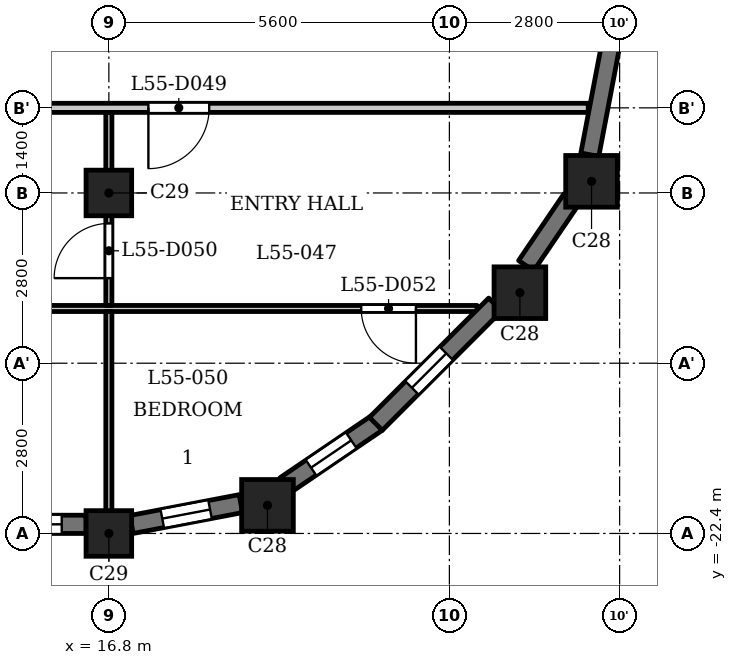
"""IFC4 building model, lengths in metres.
Left out: names, types, materials, properties, quantities, classifications, styles, units other than length and angle.
Written with IfcOpenShell. Run it as: python <this file> out.ifc"""

import sys

from ifc_helpers import new_model, si_unit, direction, frame, frame_2d, origin, origin_2d, place, context, subcontext, project, spatial, rectangle, extrude, element, fill, save


model = new_model("IFC4")
c1 = context("Model", 3, precision=1e-05, world=origin(), true_north=direction((0.0, 1.0)))
c2 = subcontext(c1, "Body", "Model", "MODEL_VIEW")
j1 = project(units=[si_unit("LENGTHUNIT", "METRE"), si_unit("PLANEANGLEUNIT", "RADIAN")], contexts=[c1])
p1 = place(None, origin())
s1 = spatial("IfcSite", under=j1, at=p1, CompositionType="ELEMENT")
p2 = place(p1, origin())
s2 = spatial("IfcBuilding", under=s1, at=p2, CompositionType="ELEMENT")
p3 = place(p2, frame((0.0, 0.0, 213.4)))
s3 = spatial("IfcBuildingStorey", under=s2, at=p3, CompositionType="ELEMENT", Elevation=213.4)
for number, where, z_axis, x_axis in (
    (1, (19.409, -21.938, 0.0), (0.0, 0.0, 1.0), (1.0, 0.0, 0.0)),
    (2, (23.56, -18.44, 0.0), (0.0, 0.0, 1.0), (1.0, 0.0, 0.0)),
    (3, (24.738, -16.609, 0.0), (0.0, 0.0, 1.0), (1.0, 0.0, 0.0)),
):
    element("IfcColumn", number, at=place(p3, frame(where, z_axis=z_axis, x_axis=x_axis)), inside=s3, PredefinedType="COLUMN", context=c2, shape_type="SweptSolid", body=[
        extrude(rectangle(XDim=0.85, YDim=0.85, at=origin_2d()), origin(), (0.0, 0.0, 1.0), 3.5),
    ])
for number, where, z_axis, x_axis in (
    (4, (16.8, -22.4, 0.0), (0.0, 0.0, 1.0), (1.0, 0.0, 0.0)),
    (5, (16.8, -16.8, 0.0), (0.0, 0.0, 1.0), (1.0, 0.0, 0.0)),
):
    element("IfcColumn", number, at=place(p3, frame(where, z_axis=z_axis, x_axis=x_axis)), inside=s3, PredefinedType="COLUMN", context=c2, shape_type="SweptSolid", body=[
        extrude(rectangle(XDim=0.75, YDim=0.75, at=origin_2d()), origin(), (0.0, 0.0, 1.0), 3.5),
    ])
p4 = place(p3, frame((14.425, -22.25, 0.0), z_axis=(0.0, 0.0, 1.0), x_axis=(1.0, 0.0, 0.0)))
e6 = element("IfcWall", 6, at=p4, inside=s3, PredefinedType="SOLIDWALL", context=c2, shape_type="SweptSolid", body=[
    extrude(rectangle(XDim=2.0, YDim=0.3, at=frame_2d((1.0, 0.0))), origin(), (0.0, 0.0, 1.0), 2.5),
])
p5 = place(p4, frame((0.4, 0.0, 0.6)))
e7 = element("IfcOpeningElement", 7, at=p5, cuts=e6, PredefinedType="OPENING", context=c2, shape_type="SweptSolid", body=[
    extrude(rectangle(XDim=1.2, YDim=1.55, at=frame_2d((0.6, 0.775))), frame((0.0, 0.16, 0.0), z_axis=(0.0, -1.0, 0.0), x_axis=(1.0, 0.0, 0.0)), (0.0, 0.0, 1.0), 0.32),
])
p6 = place(p3, frame((17.172, -22.253, 0.0), z_axis=(0.0, 0.0, 1.0), x_axis=(0.982300037503, 0.187314271538, 0.0)))
e8 = element("IfcWall", 8, at=p6, inside=s3, PredefinedType="SOLIDWALL", context=c2, shape_type="SweptSolid", body=[
    extrude(rectangle(XDim=1.831, YDim=0.3, at=frame_2d((0.916, 0.0))), origin(), (0.0, 0.0, 1.0), 2.5),
])
p7 = place(p6, frame((0.516, 0.0, 0.6)))
e9 = element("IfcOpeningElement", 9, at=p7, cuts=e8, PredefinedType="OPENING", context=c2, shape_type="SweptSolid", body=[
    extrude(rectangle(XDim=0.8, YDim=1.55, at=frame_2d((0.4, 0.775))), frame((0.0, 0.16, 0.0), z_axis=(0.0, -1.0, 0.0), x_axis=(1.0, 0.0, 0.0)), (0.0, 0.0, 1.0), 0.32),
])
p8 = place(p3, frame((19.698, -21.608, 0.0), z_axis=(0.0, 0.0, 1.0), x_axis=(0.82705295608, 0.562124014644, 0.0)))
e10 = element("IfcWall", 10, at=p8, inside=s3, PredefinedType="SOLIDWALL", context=c2, shape_type="SweptSolid", body=[
    extrude(rectangle(XDim=1.831, YDim=0.3, at=frame_2d((0.916, 0.0))), origin(), (0.0, 0.0, 1.0), 2.5),
])
p9 = place(p8, frame((0.516, 0.0, 0.6)))
e11 = element("IfcOpeningElement", 11, at=p9, cuts=e10, PredefinedType="OPENING", context=c2, shape_type="SweptSolid", body=[
    extrude(rectangle(XDim=0.8, YDim=1.55, at=frame_2d((0.4, 0.775))), frame((0.0, 0.16, 0.0), z_axis=(0.0, -1.0, 0.0), x_axis=(1.0, 0.0, 0.0)), (0.0, 0.0, 1.0), 0.32),
])
p10 = place(p3, frame((21.191, -20.597, 0.0), z_axis=(0.0, 0.0, 1.0), x_axis=(0.707150767798, 0.707062791838, 0.0)))
e12 = element("IfcWall", 12, at=p10, inside=s3, PredefinedType="SOLIDWALL", context=c2, shape_type="SweptSolid", body=[
    extrude(rectangle(XDim=2.775, YDim=0.3, at=frame_2d((1.388, 0.0))), origin(), (0.0, 0.0, 1.0), 2.5),
])
p11 = place(p10, frame((0.838, 0.0, 0.6)))
e13 = element("IfcOpeningElement", 13, at=p11, cuts=e12, PredefinedType="OPENING", context=c2, shape_type="SweptSolid", body=[
    extrude(rectangle(XDim=0.8, YDim=1.55, at=frame_2d((0.4, 0.775))), frame((0.0, 0.16, 0.0), z_axis=(0.0, -1.0, 0.0), x_axis=(1.0, 0.0, 0.0)), (0.0, 0.0, 1.0), 0.32),
])
p12 = place(p3, frame((23.662, -17.996, 0.0), z_axis=(0.0, 0.0, 1.0), x_axis=(0.562149004813, 0.827035970432, 0.0)))
e14 = element("IfcWall", 14, at=p12, inside=s3, PredefinedType="SOLIDWALL", context=c2, shape_type="SweptSolid", body=[
    extrude(rectangle(XDim=1.327, YDim=0.3, at=frame_2d((0.664, 0.0))), origin(), (0.0, 0.0, 1.0), 2.5),
])
p13 = place(p3, frame((24.709, -16.171, 0.0), z_axis=(0.0, 0.0, 1.0), x_axis=(0.187442908742, 0.982275499014, 0.0)))
e15 = element("IfcWall", 15, at=p13, inside=s3, PredefinedType="SOLIDWALL", context=c2, shape_type="SweptSolid", body=[
    extrude(rectangle(XDim=1.831, YDim=0.3, at=frame_2d((0.916, 0.0))), origin(), (0.0, 0.0, 1.0), 2.5),
])
p14 = place(p3, frame((-22.856, -18.7, 0.0), z_axis=(0.0, 0.0, 1.0), x_axis=(1.0, 0.0, 0.0)))
e16 = element("IfcWall", 16, at=p14, inside=s3, PredefinedType="PARTITIONING", context=c2, shape_type="SweptSolid", body=[
    extrude(rectangle(XDim=45.711, YDim=0.1, at=frame_2d((22.856, 0.0))), origin(), (0.0, 0.0, 1.0), 3.2),
])
p15 = place(p14, frame((4.084, 0.0, 0.0)))
e17 = element("IfcOpeningElement", 17, at=p15, cuts=e16, PredefinedType="OPENING", context=c2, shape_type="SweptSolid", body=[
    extrude(rectangle(XDim=0.9, YDim=2.1, at=frame_2d((0.45, 1.05))), frame((0.0, 0.06, 0.0), z_axis=(0.0, -1.0, 0.0), x_axis=(1.0, 0.0, 0.0)), (0.0, 0.0, 1.0), 0.12),
])
p16 = place(p14, frame((7.456, 0.0, 0.0)))
e18 = element("IfcOpeningElement", 18, at=p16, cuts=e16, PredefinedType="OPENING", context=c2, shape_type="SweptSolid", body=[
    extrude(rectangle(XDim=0.9, YDim=2.1, at=frame_2d((0.45, 1.05))), frame((0.0, 0.06, 0.0), z_axis=(0.0, -1.0, 0.0), x_axis=(1.0, 0.0, 0.0)), (0.0, 0.0, 1.0), 0.12),
])
p17 = place(p14, frame((23.506, 0.0, 0.0)))
e19 = element("IfcOpeningElement", 19, at=p17, cuts=e16, PredefinedType="OPENING", context=c2, shape_type="SweptSolid", body=[
    extrude(rectangle(XDim=0.8, YDim=2.1, at=frame_2d((0.4, 1.05))), frame((0.0, 0.06, 0.0), z_axis=(0.0, -1.0, 0.0), x_axis=(1.0, 0.0, 0.0)), (0.0, 0.0, 1.0), 0.12),
])
p18 = place(p14, frame((17.906, 0.0, 0.0)))
e20 = element("IfcOpeningElement", 20, at=p18, cuts=e16, PredefinedType="OPENING", context=c2, shape_type="SweptSolid", body=[
    extrude(rectangle(XDim=0.9, YDim=2.1, at=frame_2d((0.45, 1.05))), frame((0.0, 0.06, 0.0), z_axis=(0.0, -1.0, 0.0), x_axis=(1.0, 0.0, 0.0)), (0.0, 0.0, 1.0), 0.12),
])
p19 = place(p14, frame((43.806, 0.0, 0.0)))
e21 = element("IfcOpeningElement", 21, at=p19, cuts=e16, PredefinedType="OPENING", context=c2, shape_type="SweptSolid", body=[
    extrude(rectangle(XDim=0.9, YDim=2.1, at=frame_2d((0.45, 1.05))), frame((0.0, 0.06, 0.0), z_axis=(0.0, -1.0, 0.0), x_axis=(1.0, 0.0, 0.0)), (0.0, 0.0, 1.0), 0.12),
])
p20 = place(p14, frame((34.706, 0.0, 0.0)))
e22 = element("IfcOpeningElement", 22, at=p20, cuts=e16, PredefinedType="OPENING", context=c2, shape_type="SweptSolid", body=[
    extrude(rectangle(XDim=0.9, YDim=2.1, at=frame_2d((0.45, 1.05))), frame((0.0, 0.06, 0.0), z_axis=(0.0, -1.0, 0.0), x_axis=(1.0, 0.0, 0.0)), (0.0, 0.0, 1.0), 0.12),
])
p21 = place(p3, frame((-24.684, -15.4, 0.0), z_axis=(0.0, 0.0, 1.0), x_axis=(1.0, 0.0, 0.0)))
e23 = element("IfcWall", 23, at=p21, inside=s3, PredefinedType="PARTITIONING", context=c2, shape_type="SweptSolid", body=[
    extrude(rectangle(XDim=49.368, YDim=0.15, at=frame_2d((24.684, 0.0))), origin(), (0.0, 0.0, 1.0), 3.2),
])
p22 = place(p21, frame((1.143, 0.0, 0.0)))
e24 = element("IfcOpeningElement", 24, at=p22, cuts=e23, PredefinedType="OPENING", context=c2, shape_type="SweptSolid", body=[
    extrude(rectangle(XDim=1.0, YDim=2.1, at=frame_2d((0.5, 1.05))), frame((0.0, 0.085, 0.0), z_axis=(0.0, -1.0, 0.0), x_axis=(1.0, 0.0, 0.0)), (0.0, 0.0, 1.0), 0.17),
])
p23 = place(p21, frame((19.734, 0.0, 0.0)))
e25 = element("IfcOpeningElement", 25, at=p23, cuts=e23, PredefinedType="OPENING", context=c2, shape_type="SweptSolid", body=[
    extrude(rectangle(XDim=1.0, YDim=2.1, at=frame_2d((0.5, 1.05))), frame((0.0, 0.085, 0.0), z_axis=(0.0, -1.0, 0.0), x_axis=(1.0, 0.0, 0.0)), (0.0, 0.0, 1.0), 0.17),
])
p24 = place(p21, frame((42.134, 0.0, 0.0)))
e26 = element("IfcOpeningElement", 26, at=p24, cuts=e23, PredefinedType="OPENING", context=c2, shape_type="SweptSolid", body=[
    extrude(rectangle(XDim=1.0, YDim=2.1, at=frame_2d((0.5, 1.05))), frame((0.0, 0.085, 0.0), z_axis=(0.0, -1.0, 0.0), x_axis=(1.0, 0.0, 0.0)), (0.0, 0.0, 1.0), 0.17),
])
p25 = place(p3, frame((16.8, -22.31, 0.0), z_axis=(0.0, 0.0, 1.0), x_axis=(0.0, 1.0, 0.0)))
e27 = element("IfcWall", 27, at=p25, inside=s3, PredefinedType="PARTITIONING", context=c2, shape_type="SweptSolid", body=[
    extrude(rectangle(XDim=3.56, YDim=0.1, at=frame_2d((1.78, 0.0))), origin(), (0.0, 0.0, 1.0), 2.55),
])
p26 = place(p3, frame((16.8, -18.65, 0.0), z_axis=(0.0, 0.0, 1.0), x_axis=(0.0, 1.0, 0.0)))
e28 = element("IfcWall", 28, at=p26, inside=s3, PredefinedType="PARTITIONING", context=c2, shape_type="SweptSolid", body=[
    extrude(rectangle(XDim=3.175, YDim=0.1, at=frame_2d((1.587, 0.0))), origin(), (0.0, 0.0, 1.0), 2.55),
])
p27 = place(p26, frame((0.449, 0.0, 0.0)))
e29 = element("IfcOpeningElement", 29, at=p27, cuts=e28, PredefinedType="OPENING", context=c2, shape_type="SweptSolid", body=[
    extrude(rectangle(XDim=0.9, YDim=2.1, at=frame_2d((0.45, 1.05))), frame((0.0, 0.06, 0.0), z_axis=(0.0, -1.0, 0.0), x_axis=(1.0, 0.0, 0.0)), (0.0, 0.0, 1.0), 0.12),
])
p28 = place(p24, origin())
e30 = element("IfcDoor", 30, at=p28, inside=s3, OperationType="SINGLE_SWING_LEFT", PredefinedType="DOOR", context=c2, shape_type="SweptSolid", body=[
    extrude(rectangle(XDim=1.0, YDim=2.1, at=frame_2d((0.5, 1.05))), frame((0.0, 0.025, 0.0), z_axis=(0.0, -1.0, 0.0), x_axis=(1.0, 0.0, 0.0)), (0.0, 0.0, 1.0), 0.05),
])
fill(e26, e30)
p29 = place(p27, origin())
e31 = element("IfcDoor", 31, at=p29, inside=s3, OperationType="SINGLE_SWING_RIGHT", PredefinedType="DOOR", context=c2, shape_type="SweptSolid", body=[
    extrude(rectangle(XDim=0.9, YDim=2.1, at=frame_2d((0.45, 1.05))), frame((0.0, 0.025, 0.0), z_axis=(0.0, -1.0, 0.0), x_axis=(1.0, 0.0, 0.0)), (0.0, 0.0, 1.0), 0.05),
])
fill(e29, e31)
p30 = place(p19, origin())
e32 = element("IfcDoor", 32, at=p30, inside=s3, OperationType="SINGLE_SWING_RIGHT", PredefinedType="DOOR", context=c2, shape_type="SweptSolid", body=[
    extrude(rectangle(XDim=0.9, YDim=2.1, at=frame_2d((0.45, 1.05))), frame((0.0, 0.025, 0.0), z_axis=(0.0, -1.0, 0.0), x_axis=(1.0, 0.0, 0.0)), (0.0, 0.0, 1.0), 0.05),
])
fill(e21, e32)
p31 = place(p5, origin())
e33 = element("IfcWindow", 33, at=p31, inside=s3, PartitioningType="SINGLE_PANEL", PredefinedType="WINDOW", context=c2, shape_type="SweptSolid", body=[
    extrude(rectangle(XDim=1.2, YDim=1.55, at=frame_2d((0.6, 0.775))), frame((0.0, 0.03, 0.0), z_axis=(0.0, -1.0, 0.0), x_axis=(1.0, 0.0, 0.0)), (0.0, 0.0, 1.0), 0.06),
])
fill(e7, e33)
p32 = place(p7, origin())
e34 = element("IfcWindow", 34, at=p32, inside=s3, PartitioningType="SINGLE_PANEL", PredefinedType="WINDOW", context=c2, shape_type="SweptSolid", body=[
    extrude(rectangle(XDim=0.8, YDim=1.55, at=frame_2d((0.4, 0.775))), frame((0.0, 0.03, 0.0), z_axis=(0.0, -1.0, 0.0), x_axis=(1.0, 0.0, 0.0)), (0.0, 0.0, 1.0), 0.06),
])
fill(e9, e34)
p33 = place(p9, origin())
e35 = element("IfcWindow", 35, at=p33, inside=s3, PartitioningType="SINGLE_PANEL", PredefinedType="WINDOW", context=c2, shape_type="SweptSolid", body=[
    extrude(rectangle(XDim=0.8, YDim=1.55, at=frame_2d((0.4, 0.775))), frame((0.0, 0.03, 0.0), z_axis=(0.0, -1.0, 0.0), x_axis=(1.0, 0.0, 0.0)), (0.0, 0.0, 1.0), 0.06),
])
fill(e11, e35)
p34 = place(p11, origin())
e36 = element("IfcWindow", 36, at=p34, inside=s3, PartitioningType="SINGLE_PANEL", PredefinedType="WINDOW", context=c2, shape_type="SweptSolid", body=[
    extrude(rectangle(XDim=0.8, YDim=1.55, at=frame_2d((0.4, 0.775))), frame((0.0, 0.03, 0.0), z_axis=(0.0, -1.0, 0.0), x_axis=(1.0, 0.0, 0.0)), (0.0, 0.0, 1.0), 0.06),
])
fill(e13, e36)
save(model, sys.argv[1])
